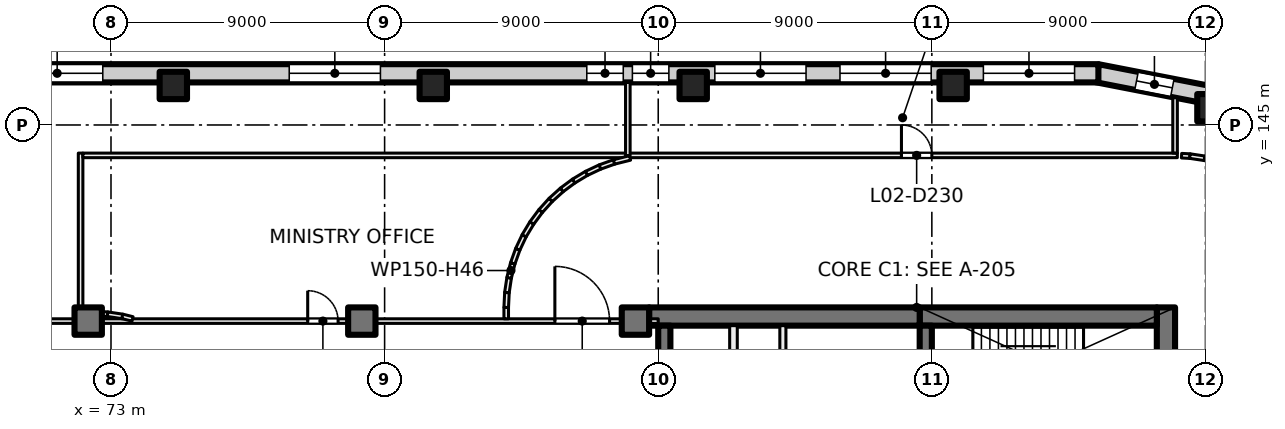
"""IFC4 building model, lengths in metres.
Left out: names, types, materials, properties, quantities, classifications, styles, units other than length and angle.
Written with IfcOpenShell. Run it as: python <this file> out.ifc"""

import sys

from ifc_helpers import new_model, si_unit, direction, frame, frame_2d, origin, origin_2d, place, context, subcontext, project, spatial, rectangle, extrude, element, fill, save


model = new_model("IFC4")
c1 = context("Model", 3, precision=1e-05, world=origin(), true_north=direction((0.0, 1.0)))
c2 = subcontext(c1, "Body", "Model", "MODEL_VIEW")
j1 = project(units=[si_unit("LENGTHUNIT", "METRE"), si_unit("PLANEANGLEUNIT", "RADIAN")], contexts=[c1])
p1 = place(None, origin())
s1 = spatial("IfcSite", under=j1, at=p1, CompositionType="ELEMENT")
p2 = place(p1, origin())
s2 = spatial("IfcBuilding", under=s1, at=p2, CompositionType="ELEMENT")
p3 = place(p2, frame((0.0, 0.0, 12.5)))
s3 = spatial("IfcBuildingStorey", under=s2, at=p3, CompositionType="ELEMENT", Elevation=12.5)
for number, where, z_axis, x_axis in (
    (1, (75.05, 146.3, 0.0), (0.0, 0.0, 1.0), (1.0, 0.0, 0.0)),
    (2, (83.6, 146.3, 0.0), (0.0, 0.0, 1.0), (1.0, 0.0, 0.0)),
    (3, (92.15, 146.3, 0.0), (0.0, 0.0, 1.0), (1.0, 0.0, 0.0)),
    (4, (100.7, 146.3, 0.0), (0.0, 0.0, 1.0), (1.0, 0.0, 0.0)),
    (5, (109.18, 145.567, 0.0), (0.0, 0.0, 1.0), (1.0, 0.0, 0.0)),
    (6, (72.25, 138.55, 0.0), (0.0, 0.0, 1.0), (1.0, 0.0, 0.0)),
    (7, (81.25, 138.55, 0.0), (0.0, 0.0, 1.0), (1.0, 0.0, 0.0)),
    (8, (90.25, 138.55, 0.0), (0.0, 0.0, 1.0), (1.0, 0.0, 0.0)),
):
    element("IfcColumn", number, at=place(p3, frame(where, z_axis=z_axis, x_axis=x_axis)), inside=s3, PredefinedType="COLUMN", context=c2, shape_type="SweptSolid", body=[
        extrude(rectangle(XDim=0.9, YDim=0.9, at=origin_2d()), origin(), (0.0, 0.0, 1.0), 5.0),
    ])
p4 = place(p3, frame((107.7, 139.0, 0.0), z_axis=(0.0, 0.0, 1.0), x_axis=(0.0, -1.0, 0.0)))
e9 = element("IfcWall", 9, at=p4, inside=s3, PredefinedType="SHEAR", context=c2, shape_type="SweptSolid", body=[
    extrude(rectangle(XDim=3.8, YDim=0.6, at=frame_2d((1.9, 0.0))), origin(), (0.0, 0.0, 1.0), 5.0),
])
p5 = place(p3, frame((107.4, 138.7, 0.0), z_axis=(0.0, 0.0, 1.0), x_axis=(-1.0, 0.0, 0.0)))
e10 = element("IfcWall", 10, at=p5, inside=s3, PredefinedType="SHEAR", context=c2, shape_type="SweptSolid", body=[
    extrude(rectangle(XDim=7.8, YDim=0.6, at=frame_2d((3.9, 0.0))), origin(), (0.0, 0.0, 1.0), 5.0),
])
p6 = place(p3, frame((99.6, 138.7, 0.0), z_axis=(0.0, 0.0, 1.0), x_axis=(-1.0, 0.0, 0.0)))
e11 = element("IfcWall", 11, at=p6, inside=s3, PredefinedType="SHEAR", context=c2, shape_type="SweptSolid", body=[
    extrude(rectangle(XDim=8.9, YDim=0.6, at=frame_2d((4.45, 0.0))), origin(), (0.0, 0.0, 1.0), 5.0),
])
p7 = place(p3, frame((99.8, 138.4, 0.0), z_axis=(0.0, 0.0, 1.0), x_axis=(0.0, -1.0, 0.0)))
e12 = element("IfcWall", 12, at=p7, inside=s3, PredefinedType="SHEAR", context=c2, shape_type="SweptSolid", body=[
    extrude(rectangle(XDim=2.8, YDim=0.4, at=frame_2d((1.4, 0.0))), origin(), (0.0, 0.0, 1.0), 5.0),
])
p8 = place(p7, frame((0.9, 0.0, 0.0)))
e13 = element("IfcOpeningElement", 13, at=p8, cuts=e12, PredefinedType="OPENING", context=c2, shape_type="SweptSolid", body=[
    extrude(rectangle(XDim=1.0, YDim=2.1, at=frame_2d((0.5, 1.05))), frame((0.0, 0.21, 0.0), z_axis=(0.0, -1.0, 0.0), x_axis=(1.0, 0.0, 0.0)), (0.0, 0.0, 1.0), 0.42),
])
p9 = place(p3, frame((91.2, 138.4, 0.0), z_axis=(0.0, 0.0, 1.0), x_axis=(0.0, -1.0, 0.0)))
e14 = element("IfcWall", 14, at=p9, inside=s3, PredefinedType="SHEAR", context=c2, shape_type="SweptSolid", body=[
    extrude(rectangle(XDim=8.6, YDim=0.4, at=frame_2d((4.3, 0.0))), origin(), (0.0, 0.0, 1.0), 5.0),
])
p10 = place(p3, frame((105.44, 146.702, 0.0), z_axis=(0.0, 0.0, 1.0), x_axis=(0.981593603981, -0.190981665674, 0.0)))
e15 = element("IfcWall", 15, at=p10, inside=s3, PredefinedType="SOLIDWALL", context=c2, shape_type="SweptSolid", body=[
    extrude(rectangle(XDim=4.025, YDim=0.6, at=frame_2d((2.013, 0.0))), origin(), (0.0, 0.0, 1.0), 4.6),
])
p11 = place(p10, frame((1.316, 0.0, 0.9)))
e16 = element("IfcOpeningElement", 16, at=p11, cuts=e15, PredefinedType="OPENING", context=c2, shape_type="SweptSolid", body=[
    extrude(rectangle(XDim=1.2, YDim=3.0, at=frame_2d((0.6, 1.5))), frame((0.0, 0.31, 0.0), z_axis=(0.0, -1.0, 0.0), x_axis=(1.0, 0.0, 0.0)), (0.0, 0.0, 1.0), 0.62),
])
p12 = place(p3, frame((46.114, 146.7, 0.0), z_axis=(0.0, 0.0, 1.0), x_axis=(1.0, 0.0, 0.0)))
e17 = element("IfcWall", 17, at=p12, inside=s3, PredefinedType="SOLIDWALL", context=c2, shape_type="SweptSolid", body=[
    extrude(rectangle(XDim=59.364, YDim=0.6, at=frame_2d((29.682, 0.0))), origin(), (0.0, 0.0, 1.0), 4.6),
])
p13 = place(p12, frame((5.35, 0.0, 0.9)))
e18 = element("IfcOpeningElement", 18, at=p13, cuts=e17, PredefinedType="OPENING", context=c2, shape_type="SweptSolid", body=[
    extrude(rectangle(XDim=3.0, YDim=3.0, at=frame_2d((1.5, 1.5))), frame((0.0, 0.31, 0.0), z_axis=(0.0, -1.0, 0.0), x_axis=(1.0, 0.0, 0.0)), (0.0, 0.0, 1.0), 0.62),
])
p14 = place(p12, frame((14.483, 0.0, 0.9)))
e19 = element("IfcOpeningElement", 19, at=p14, cuts=e17, PredefinedType="OPENING", context=c2, shape_type="SweptSolid", body=[
    extrude(rectangle(XDim=3.0, YDim=3.0, at=frame_2d((1.5, 1.5))), frame((0.0, 0.31, 0.0), z_axis=(0.0, -1.0, 0.0), x_axis=(1.0, 0.0, 0.0)), (0.0, 0.0, 1.0), 0.62),
])
p15 = place(p12, frame((23.615, 0.0, 0.9)))
e20 = element("IfcOpeningElement", 20, at=p15, cuts=e17, PredefinedType="OPENING", context=c2, shape_type="SweptSolid", body=[
    extrude(rectangle(XDim=3.0, YDim=3.0, at=frame_2d((1.5, 1.5))), frame((0.0, 0.31, 0.0), z_axis=(0.0, -1.0, 0.0), x_axis=(1.0, 0.0, 0.0)), (0.0, 0.0, 1.0), 0.62),
])
p16 = place(p12, frame((32.749, 0.0, 0.9)))
e21 = element("IfcOpeningElement", 21, at=p16, cuts=e17, PredefinedType="OPENING", context=c2, shape_type="SweptSolid", body=[
    extrude(rectangle(XDim=3.0, YDim=3.0, at=frame_2d((1.5, 1.5))), frame((0.0, 0.31, 0.0), z_axis=(0.0, -1.0, 0.0), x_axis=(1.0, 0.0, 0.0)), (0.0, 0.0, 1.0), 0.62),
])
p17 = place(p12, frame((42.536, 0.0, 0.9)))
e22 = element("IfcOpeningElement", 22, at=p17, cuts=e17, PredefinedType="OPENING", context=c2, shape_type="SweptSolid", body=[
    extrude(rectangle(XDim=1.2, YDim=3.0, at=frame_2d((0.6, 1.5))), frame((0.0, 0.31, 0.0), z_axis=(0.0, -1.0, 0.0), x_axis=(1.0, 0.0, 0.0)), (0.0, 0.0, 1.0), 0.62),
])
p18 = place(p12, frame((44.036, 0.0, 0.9)))
e23 = element("IfcOpeningElement", 23, at=p18, cuts=e17, PredefinedType="OPENING", context=c2, shape_type="SweptSolid", body=[
    extrude(rectangle(XDim=1.2, YDim=3.0, at=frame_2d((0.6, 1.5))), frame((0.0, 0.31, 0.0), z_axis=(0.0, -1.0, 0.0), x_axis=(1.0, 0.0, 0.0)), (0.0, 0.0, 1.0), 0.62),
])
p19 = place(p12, frame((46.748, 0.0, 0.9)))
e24 = element("IfcOpeningElement", 24, at=p19, cuts=e17, PredefinedType="OPENING", context=c2, shape_type="SweptSolid", body=[
    extrude(rectangle(XDim=3.0, YDim=3.0, at=frame_2d((1.5, 1.5))), frame((0.0, 0.31, 0.0), z_axis=(0.0, -1.0, 0.0), x_axis=(1.0, 0.0, 0.0)), (0.0, 0.0, 1.0), 0.62),
])
p20 = place(p12, frame((50.865, 0.0, 0.9)))
e25 = element("IfcOpeningElement", 25, at=p20, cuts=e17, PredefinedType="OPENING", context=c2, shape_type="SweptSolid", body=[
    extrude(rectangle(XDim=3.0, YDim=3.0, at=frame_2d((1.5, 1.5))), frame((0.0, 0.31, 0.0), z_axis=(0.0, -1.0, 0.0), x_axis=(1.0, 0.0, 0.0)), (0.0, 0.0, 1.0), 0.62),
])
p21 = place(p12, frame((55.581, 0.0, 0.9)))
e26 = element("IfcOpeningElement", 26, at=p21, cuts=e17, PredefinedType="OPENING", context=c2, shape_type="SweptSolid", body=[
    extrude(rectangle(XDim=3.0, YDim=3.0, at=frame_2d((1.5, 1.5))), frame((0.0, 0.31, 0.0), z_axis=(0.0, -1.0, 0.0), x_axis=(1.0, 0.0, 0.0)), (0.0, 0.0, 1.0), 0.62),
])
p22 = place(p3, frame((95.1, 130.0, 0.0), z_axis=(0.0, 0.0, 1.0), x_axis=(0.0, 1.0, 0.0)))
e27 = element("IfcWall", 27, at=p22, inside=s3, PredefinedType="PARTITIONING", context=c2, shape_type="SweptSolid", body=[
    extrude(rectangle(XDim=8.4, YDim=0.2, at=frame_2d((4.2, 0.0))), origin(), (0.0, 0.0, 1.0), 4.6),
])
p23 = place(p22, frame((5.25, 0.0, 0.0)))
e28 = element("IfcOpeningElement", 28, at=p23, cuts=e27, PredefinedType="OPENING", context=c2, shape_type="SweptSolid", body=[
    extrude(rectangle(XDim=1.5, YDim=2.1, at=frame_2d((0.75, 1.05))), frame((0.0, 0.11, 0.0), z_axis=(0.0, -1.0, 0.0), x_axis=(1.0, 0.0, 0.0)), (0.0, 0.0, 1.0), 0.22),
])
p24 = place(p3, frame((93.475, 130.0, 0.0), z_axis=(0.0, 0.0, 1.0), x_axis=(0.0, 1.0, 0.0)))
e29 = element("IfcWall", 29, at=p24, inside=s3, PredefinedType="PARTITIONING", context=c2, shape_type="SweptSolid", body=[
    extrude(rectangle(XDim=8.4, YDim=0.25, at=frame_2d((4.2, 0.0))), origin(), (0.0, 0.0, 1.0), 4.6),
])
p25 = place(p24, frame((0.975, 0.0, 0.0)))
e30 = element("IfcOpeningElement", 30, at=p25, cuts=e29, PredefinedType="OPENING", context=c2, shape_type="SweptSolid", body=[
    extrude(rectangle(XDim=0.8, YDim=2.1, at=frame_2d((0.4, 1.05))), frame((0.0, 0.135, 0.0), z_axis=(0.0, -1.0, 0.0), x_axis=(1.0, 0.0, 0.0)), (0.0, 0.0, 1.0), 0.27),
])
p26 = place(p24, frame((5.225, 0.0, 0.0)))
e31 = element("IfcOpeningElement", 31, at=p26, cuts=e29, PredefinedType="OPENING", context=c2, shape_type="SweptSolid", body=[
    extrude(rectangle(XDim=0.8, YDim=2.1, at=frame_2d((0.4, 1.05))), frame((0.0, 0.135, 0.0), z_axis=(0.0, -1.0, 0.0), x_axis=(1.0, 0.0, 0.0)), (0.0, 0.0, 1.0), 0.27),
])
p27 = place(p3, frame((49.825, 138.55, 0.0), z_axis=(0.0, 0.0, 1.0), x_axis=(1.0, 0.0, 0.0)))
e32 = element("IfcWall", 32, at=p27, inside=s3, PredefinedType="PARTITIONING", context=c2, shape_type="SweptSolid", body=[
    extrude(rectangle(XDim=41.175, YDim=0.15, at=frame_2d((20.587, 0.0))), origin(), (0.0, 0.0, 1.0), 4.6),
])
p28 = place(p27, frame((29.645, 0.0, 0.0)))
e33 = element("IfcOpeningElement", 33, at=p28, cuts=e32, PredefinedType="OPENING", context=c2, shape_type="SweptSolid", body=[
    extrude(rectangle(XDim=1.0, YDim=2.1, at=frame_2d((0.5, 1.05))), frame((0.0, 0.085, 0.0), z_axis=(0.0, -1.0, 0.0), x_axis=(1.0, 0.0, 0.0)), (0.0, 0.0, 1.0), 0.17),
])
p29 = place(p27, frame((37.775, 0.0, 0.0)))
e34 = element("IfcOpeningElement", 34, at=p29, cuts=e32, PredefinedType="OPENING", context=c2, shape_type="SweptSolid", body=[
    extrude(rectangle(XDim=1.8, YDim=2.1, at=frame_2d((0.9, 1.05))), frame((0.0, 0.085, 0.0), z_axis=(0.0, -1.0, 0.0), x_axis=(1.0, 0.0, 0.0)), (0.0, 0.0, 1.0), 0.17),
])
p30 = place(p3, frame((72.0, 138.725, 0.0), z_axis=(0.0, 0.0, 1.0), x_axis=(0.0, 1.0, 0.0)))
e35 = element("IfcWall", 35, at=p30, inside=s3, PredefinedType="PARTITIONING", context=c2, shape_type="SweptSolid", body=[
    extrude(rectangle(XDim=5.35, YDim=0.15, at=frame_2d((2.675, 0.0))), origin(), (0.0, 0.0, 1.0), 4.6),
])
p31 = place(p3, frame((72.075, 138.8, 0.0), z_axis=(0.0, 0.0, 1.0), x_axis=(1.0, 0.0, 0.0)))
e36 = element("IfcWall", 36, at=p31, inside=s3, PredefinedType="PARTITIONING", context=c2, shape_type="SweptSolid", body=[
    extrude(rectangle(XDim=0.327, YDim=0.15, at=frame_2d((0.164, 0.0))), origin(), (0.0, 0.0, 1.0), 4.6),
])
p32 = place(p3, frame((72.075, 144.0, 0.0), z_axis=(0.0, 0.0, 1.0), x_axis=(1.0, 0.0, 0.0)))
e37 = element("IfcWall", 37, at=p32, inside=s3, PredefinedType="PARTITIONING", context=c2, shape_type="SweptSolid", body=[
    extrude(rectangle(XDim=36.0, YDim=0.15, at=frame_2d((18.0, 0.0))), origin(), (0.0, 0.0, 1.0), 4.6),
])
p33 = place(p32, frame((26.925, 0.0, 0.0)))
e38 = element("IfcOpeningElement", 38, at=p33, cuts=e37, PredefinedType="OPENING", context=c2, shape_type="SweptSolid", body=[
    extrude(rectangle(XDim=1.0, YDim=2.1, at=frame_2d((0.5, 1.05))), frame((0.0, 0.085, 0.0), z_axis=(0.0, -1.0, 0.0), x_axis=(1.0, 0.0, 0.0)), (0.0, 0.0, 1.0), 0.17),
])
p34 = place(p3, frame((72.398, 138.8, 0.0), z_axis=(0.0, 0.0, 1.0), x_axis=(0.998815266503, -0.048662751665, 0.0)))
e39 = element("IfcWall", 39, at=p34, inside=s3, PredefinedType="PARTITIONING", context=c2, shape_type="SweptSolid", body=[
    extrude(rectangle(XDim=0.497, YDim=0.15, at=frame_2d((0.248, 0.0))), origin(), (0.0, 0.0, 1.0), 4.6),
])
p35 = place(p3, frame((72.886, 138.777, 0.0), z_axis=(0.0, 0.0, 1.0), x_axis=(0.988853572557, -0.148891275908, 0.0)))
e40 = element("IfcWall", 40, at=p35, inside=s3, PredefinedType="PARTITIONING", context=c2, shape_type="SweptSolid", body=[
    extrude(rectangle(XDim=0.499, YDim=0.15, at=frame_2d((0.249, 0.0))), origin(), (0.0, 0.0, 1.0), 4.6),
])
p36 = place(p3, frame((73.371, 138.705, 0.0), z_axis=(0.0, 0.0, 1.0), x_axis=(0.969811847647, -0.243854424119, 0.0)))
e41 = element("IfcWall", 41, at=p36, inside=s3, PredefinedType="PARTITIONING", context=c2, shape_type="SweptSolid", body=[
    extrude(rectangle(XDim=0.348, YDim=0.15, at=frame_2d((0.174, 0.0))), origin(), (0.0, 0.0, 1.0), 4.6),
])
p37 = place(p3, frame((86.0, 138.625, 0.0), z_axis=(0.0, 0.0, 1.0), x_axis=(0.0, 1.0, 0.0)))
e42 = element("IfcWall", 42, at=p37, inside=s3, PredefinedType="PARTITIONING", context=c2, shape_type="SweptSolid", body=[
    extrude(rectangle(XDim=0.377, YDim=0.15, at=frame_2d((0.188, 0.0))), origin(), (0.0, 0.0, 1.0), 4.6),
])
p38 = place(p3, frame((86.0, 138.998, 0.0), z_axis=(0.0, 0.0, 1.0), x_axis=(0.048196018647, 0.998837896651, 0.0)))
e43 = element("IfcWall", 43, at=p38, inside=s3, PredefinedType="PARTITIONING", context=c2, shape_type="SweptSolid", body=[
    extrude(rectangle(XDim=0.496, YDim=0.15, at=frame_2d((0.248, 0.0))), origin(), (0.0, 0.0, 1.0), 4.6),
])
p39 = place(p3, frame((86.023, 139.486, 0.0), z_axis=(0.0, 0.0, 1.0), x_axis=(0.148412307247, 0.988925572052, 0.0)))
e44 = element("IfcWall", 44, at=p39, inside=s3, PredefinedType="PARTITIONING", context=c2, shape_type="SweptSolid", body=[
    extrude(rectangle(XDim=0.499, YDim=0.15, at=frame_2d((0.249, 0.0))), origin(), (0.0, 0.0, 1.0), 4.6),
])
p40 = place(p3, frame((86.095, 139.971, 0.0), z_axis=(0.0, 0.0, 1.0), x_axis=(0.242650732785, 0.970113715952, 0.0)))
e45 = element("IfcWall", 45, at=p40, inside=s3, PredefinedType="PARTITIONING", context=c2, shape_type="SweptSolid", body=[
    extrude(rectangle(XDim=0.499, YDim=0.15, at=frame_2d((0.25, 0.0))), origin(), (0.0, 0.0, 1.0), 4.6),
])
for number, where, z_axis, x_axis in (
    (46, (86.214, 140.447, 0.0), (0.0, 0.0, 1.0), (0.337, 0.941, 0.0)),
    (47, (86.379, 140.91, 0.0), (0.0, 0.0, 1.0), (0.428, 0.904, 0.0)),
):
    element("IfcWall", number, at=place(p3, frame(where, z_axis=z_axis, x_axis=x_axis)), inside=s3, PredefinedType="PARTITIONING", context=c2, shape_type="SweptSolid", body=[
        extrude(rectangle(XDim=0.498, YDim=0.15, at=frame_2d((0.249, 0.0))), origin(), (0.0, 0.0, 1.0), 4.6),
    ])
p41 = place(p3, frame((86.588, 141.354, 0.0), z_axis=(0.0, 0.0, 1.0), x_axis=(0.515791778052, 0.85671397893, 0.0)))
e48 = element("IfcWall", 48, at=p41, inside=s3, PredefinedType="PARTITIONING", context=c2, shape_type="SweptSolid", body=[
    extrude(rectangle(XDim=0.499, YDim=0.15, at=frame_2d((0.249, 0.0))), origin(), (0.0, 0.0, 1.0), 4.6),
])
p42 = place(p3, frame((86.841, 141.775, 0.0), z_axis=(0.0, 0.0, 1.0), x_axis=(0.594570362092, 0.80404358372, 0.0)))
e49 = element("IfcWall", 49, at=p42, inside=s3, PredefinedType="PARTITIONING", context=c2, shape_type="SweptSolid", body=[
    extrude(rectangle(XDim=0.498, YDim=0.15, at=frame_2d((0.249, 0.0))), origin(), (0.0, 0.0, 1.0), 4.6),
])
for number, where, z_axis, x_axis in (
    (50, (87.133, 142.169, 0.0), (0.0, 0.0, 1.0), (0.67, 0.742, 0.0)),
    (51, (87.461, 142.533, 0.0), (0.0, 0.0, 1.0), (0.742, 0.67, 0.0)),
):
    element("IfcWall", number, at=place(p3, frame(where, z_axis=z_axis, x_axis=x_axis)), inside=s3, PredefinedType="PARTITIONING", context=c2, shape_type="SweptSolid", body=[
        extrude(rectangle(XDim=0.499, YDim=0.15, at=frame_2d((0.249, 0.0))), origin(), (0.0, 0.0, 1.0), 4.6),
    ])
p43 = place(p3, frame((87.825, 142.863, 0.0), z_axis=(0.0, 0.0, 1.0), x_axis=(0.80404358372, 0.594570362092, 0.0)))
e52 = element("IfcWall", 52, at=p43, inside=s3, PredefinedType="PARTITIONING", context=c2, shape_type="SweptSolid", body=[
    extrude(rectangle(XDim=0.498, YDim=0.15, at=frame_2d((0.249, 0.0))), origin(), (0.0, 0.0, 1.0), 4.6),
])
p44 = place(p3, frame((88.219, 143.155, 0.0), z_axis=(0.0, 0.0, 1.0), x_axis=(0.85671397893, 0.515791778052, 0.0)))
e53 = element("IfcWall", 53, at=p44, inside=s3, PredefinedType="PARTITIONING", context=c2, shape_type="SweptSolid", body=[
    extrude(rectangle(XDim=0.499, YDim=0.15, at=frame_2d((0.249, 0.0))), origin(), (0.0, 0.0, 1.0), 4.6),
])
for number, where, z_axis, x_axis in (
    (54, (88.64, 143.408, 0.0), (0.0, 0.0, 1.0), (0.904, 0.428, 0.0)),
    (55, (89.084, 143.618, 0.0), (0.0, 0.0, 1.0), (0.941, 0.337, 0.0)),
):
    element("IfcWall", number, at=place(p3, frame(where, z_axis=z_axis, x_axis=x_axis)), inside=s3, PredefinedType="PARTITIONING", context=c2, shape_type="SweptSolid", body=[
        extrude(rectangle(XDim=0.498, YDim=0.15, at=frame_2d((0.249, 0.0))), origin(), (0.0, 0.0, 1.0), 4.6),
    ])
p45 = place(p3, frame((89.545, 143.784, 0.0), z_axis=(0.0, 0.0, 1.0), x_axis=(0.970116111764, 0.242641154168, 0.0)))
e56 = element("IfcWall", 56, at=p45, inside=s3, PredefinedType="PARTITIONING", context=c2, shape_type="SweptSolid", body=[
    extrude(rectangle(XDim=0.544, YDim=0.15, at=frame_2d((0.272, 0.0))), origin(), (0.0, 0.0, 1.0), 4.6),
])
p46 = place(p3, frame((90.0, 143.995, 0.0), z_axis=(0.0, 0.0, 1.0), x_axis=(0.0, 1.0, 0.0)))
e57 = element("IfcWall", 57, at=p46, inside=s3, PredefinedType="PARTITIONING", context=c2, shape_type="SweptSolid", body=[
    extrude(rectangle(XDim=2.405, YDim=0.15, at=frame_2d((1.202, 0.0))), origin(), (0.0, 0.0, 1.0), 4.6),
])
p47 = place(p3, frame((108.0, 144.075, 0.0), z_axis=(0.0, 0.0, 1.0), x_axis=(0.0, 1.0, 0.0)))
e58 = element("IfcWall", 58, at=p47, inside=s3, PredefinedType="PARTITIONING", context=c2, shape_type="SweptSolid", body=[
    extrude(rectangle(XDim=1.823, YDim=0.15, at=frame_2d((0.912, 0.0))), origin(), (0.0, 0.0, 1.0), 4.6),
])
p48 = place(p3, frame((108.214, 143.99, 0.0), z_axis=(0.0, 0.0, 1.0), x_axis=(0.99876534507, -0.049676810357, 0.0)))
e59 = element("IfcWall", 59, at=p48, inside=s3, PredefinedType="PARTITIONING", context=c2, shape_type="SweptSolid", body=[
    extrude(rectangle(XDim=0.28, YDim=0.15, at=frame_2d((0.14, 0.0))), origin(), (0.0, 0.0, 1.0), 4.6),
])
p49 = place(p3, frame((108.486, 143.977, 0.0), z_axis=(0.0, 0.0, 1.0), x_axis=(0.988925572052, -0.148412307247, 0.0)))
e60 = element("IfcWall", 60, at=p49, inside=s3, PredefinedType="PARTITIONING", context=c2, shape_type="SweptSolid", body=[
    extrude(rectangle(XDim=0.499, YDim=0.15, at=frame_2d((0.249, 0.0))), origin(), (0.0, 0.0, 1.0), 4.6),
])
p50 = place(p3, frame((108.971, 143.905, 0.0), z_axis=(0.0, 0.0, 1.0), x_axis=(0.970113715952, -0.242650732785, 0.0)))
e61 = element("IfcWall", 61, at=p50, inside=s3, PredefinedType="PARTITIONING", context=c2, shape_type="SweptSolid", body=[
    extrude(rectangle(XDim=0.499, YDim=0.15, at=frame_2d((0.25, 0.0))), origin(), (0.0, 0.0, 1.0), 4.6),
])
p51 = place(p11, origin())
e62 = element("IfcWindow", 62, at=p51, inside=s3, PartitioningType="SINGLE_PANEL", PredefinedType="WINDOW", context=c2, shape_type="SweptSolid", body=[
    extrude(rectangle(XDim=1.2, YDim=3.0, at=frame_2d((0.6, 1.5))), frame((0.0, 0.03, 0.0), z_axis=(0.0, -1.0, 0.0), x_axis=(1.0, 0.0, 0.0)), (0.0, 0.0, 1.0), 0.06),
])
fill(e16, e62)
p52 = place(p15, origin())
e63 = element("IfcWindow", 63, at=p52, inside=s3, PartitioningType="SINGLE_PANEL", PredefinedType="WINDOW", context=c2, shape_type="SweptSolid", body=[
    extrude(rectangle(XDim=3.0, YDim=3.0, at=frame_2d((1.5, 1.5))), frame((0.0, 0.03, 0.0), z_axis=(0.0, -1.0, 0.0), x_axis=(1.0, 0.0, 0.0)), (0.0, 0.0, 1.0), 0.06),
])
fill(e20, e63)
p53 = place(p16, origin())
e64 = element("IfcWindow", 64, at=p53, inside=s3, PartitioningType="SINGLE_PANEL", PredefinedType="WINDOW", context=c2, shape_type="SweptSolid", body=[
    extrude(rectangle(XDim=3.0, YDim=3.0, at=frame_2d((1.5, 1.5))), frame((0.0, 0.03, 0.0), z_axis=(0.0, -1.0, 0.0), x_axis=(1.0, 0.0, 0.0)), (0.0, 0.0, 1.0), 0.06),
])
fill(e21, e64)
p54 = place(p17, origin())
e65 = element("IfcWindow", 65, at=p54, inside=s3, PartitioningType="SINGLE_PANEL", PredefinedType="WINDOW", context=c2, shape_type="SweptSolid", body=[
    extrude(rectangle(XDim=1.2, YDim=3.0, at=frame_2d((0.6, 1.5))), frame((0.0, 0.03, 0.0), z_axis=(0.0, -1.0, 0.0), x_axis=(1.0, 0.0, 0.0)), (0.0, 0.0, 1.0), 0.06),
])
fill(e22, e65)
p55 = place(p18, origin())
e66 = element("IfcWindow", 66, at=p55, inside=s3, PartitioningType="SINGLE_PANEL", PredefinedType="WINDOW", context=c2, shape_type="SweptSolid", body=[
    extrude(rectangle(XDim=1.2, YDim=3.0, at=frame_2d((0.6, 1.5))), frame((0.0, 0.03, 0.0), z_axis=(0.0, -1.0, 0.0), x_axis=(1.0, 0.0, 0.0)), (0.0, 0.0, 1.0), 0.06),
])
fill(e23, e66)
p56 = place(p19, origin())
e67 = element("IfcWindow", 67, at=p56, inside=s3, PartitioningType="SINGLE_PANEL", PredefinedType="WINDOW", context=c2, shape_type="SweptSolid", body=[
    extrude(rectangle(XDim=3.0, YDim=3.0, at=frame_2d((1.5, 1.5))), frame((0.0, 0.03, 0.0), z_axis=(0.0, -1.0, 0.0), x_axis=(1.0, 0.0, 0.0)), (0.0, 0.0, 1.0), 0.06),
])
fill(e24, e67)
p57 = place(p20, origin())
e68 = element("IfcWindow", 68, at=p57, inside=s3, PartitioningType="SINGLE_PANEL", PredefinedType="WINDOW", context=c2, shape_type="SweptSolid", body=[
    extrude(rectangle(XDim=3.0, YDim=3.0, at=frame_2d((1.5, 1.5))), frame((0.0, 0.03, 0.0), z_axis=(0.0, -1.0, 0.0), x_axis=(1.0, 0.0, 0.0)), (0.0, 0.0, 1.0), 0.06),
])
fill(e25, e68)
p58 = place(p21, origin())
e69 = element("IfcWindow", 69, at=p58, inside=s3, PartitioningType="SINGLE_PANEL", PredefinedType="WINDOW", context=c2, shape_type="SweptSolid", body=[
    extrude(rectangle(XDim=3.0, YDim=3.0, at=frame_2d((1.5, 1.5))), frame((0.0, 0.03, 0.0), z_axis=(0.0, -1.0, 0.0), x_axis=(1.0, 0.0, 0.0)), (0.0, 0.0, 1.0), 0.06),
])
fill(e26, e69)
p59 = place(p28, origin())
e70 = element("IfcDoor", 70, at=p59, inside=s3, OperationType="SINGLE_SWING_LEFT", PredefinedType="DOOR", context=c2, shape_type="SweptSolid", body=[
    extrude(rectangle(XDim=1.0, YDim=2.1, at=frame_2d((0.5, 1.05))), frame((0.0, 0.025, 0.0), z_axis=(0.0, -1.0, 0.0), x_axis=(1.0, 0.0, 0.0)), (0.0, 0.0, 1.0), 0.05),
])
fill(e33, e70)
p60 = place(p29, origin())
e71 = element("IfcDoor", 71, at=p60, inside=s3, OperationType="DOUBLE_DOOR_SINGLE_SWING", PredefinedType="DOOR", context=c2, shape_type="SweptSolid", body=[
    extrude(rectangle(XDim=1.8, YDim=2.1, at=frame_2d((0.9, 1.05))), frame((0.0, 0.025, 0.0), z_axis=(0.0, -1.0, 0.0), x_axis=(1.0, 0.0, 0.0)), (0.0, 0.0, 1.0), 0.05),
])
fill(e34, e71)
p61 = place(p33, origin())
e72 = element("IfcDoor", 72, at=p61, inside=s3, OperationType="SINGLE_SWING_LEFT", PredefinedType="DOOR", context=c2, shape_type="SweptSolid", body=[
    extrude(rectangle(XDim=1.0, YDim=2.1, at=frame_2d((0.5, 1.05))), frame((0.0, 0.025, 0.0), z_axis=(0.0, -1.0, 0.0), x_axis=(1.0, 0.0, 0.0)), (0.0, 0.0, 1.0), 0.05),
])
fill(e38, e72)
save(model, sys.argv[1])
